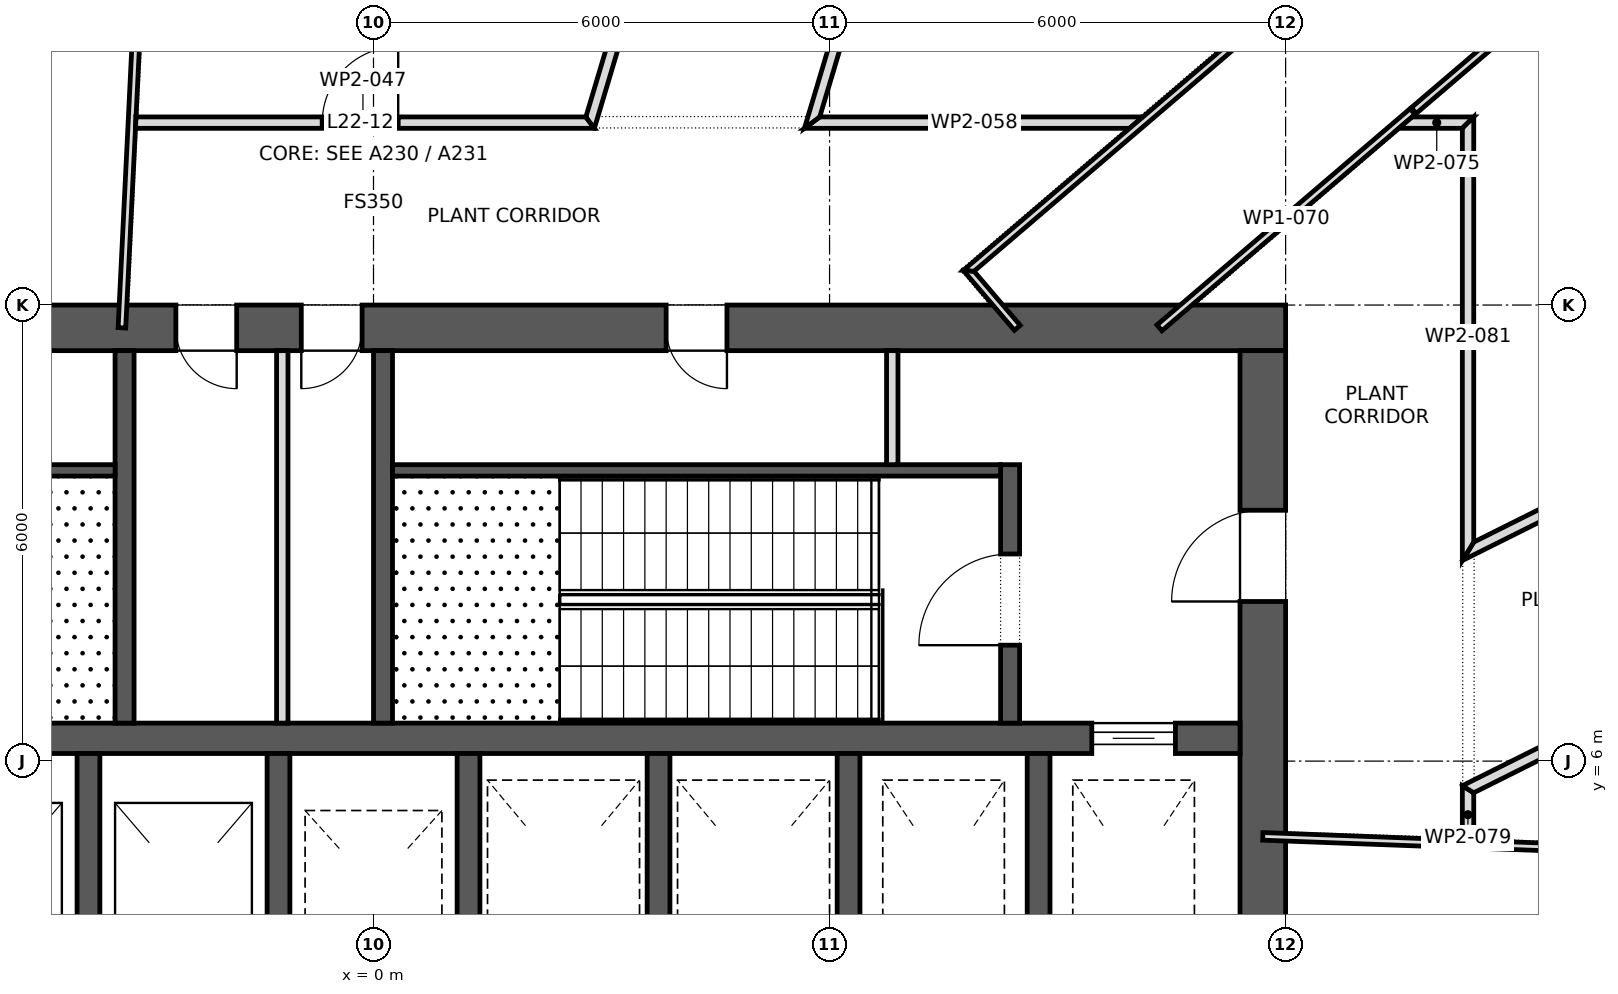
"""IFC4 building model, lengths in metres.
Left out: names, types, materials, properties, quantities, classifications, styles, units other than length and angle.
Written with IfcOpenShell. Run it as: python <this file> out.ifc"""

import sys

from ifc_helpers import new_model, si_unit, direction, frame, frame_2d, origin, place, context, subcontext, project, spatial, polyline, rectangle, outline, extrude, element, fill, save


model = new_model("IFC4")
c1 = context("Model", 3, precision=1e-05, world=origin(), true_north=direction((0.0, 1.0)))
c2 = subcontext(c1, "Body", "Model", "MODEL_VIEW")
j1 = project(units=[si_unit("LENGTHUNIT", "METRE"), si_unit("PLANEANGLEUNIT", "RADIAN")], contexts=[c1])
p1 = place(None, origin())
s1 = spatial("IfcSite", under=j1, at=p1, CompositionType="ELEMENT")
p2 = place(p1, origin())
s2 = spatial("IfcBuilding", under=s1, at=p2, CompositionType="ELEMENT")
p3 = place(p2, frame((0.0, 0.0, 99.1)))
s3 = spatial("IfcBuildingStorey", under=s2, at=p3, CompositionType="ELEMENT", Elevation=99.1)
p4 = place(p3, frame((-12.0, 11.7, 0.0), z_axis=(0.0, 0.0, 1.0), x_axis=(1.0, 0.0, 0.0)))
e1 = element("IfcWall", 1, at=p4, inside=s3, PredefinedType="SHEAR", context=c2, shape_type="SweptSolid", body=[
    extrude(rectangle(XDim=24.0, YDim=0.6, at=frame_2d((12.0, 0.0))), origin(), (0.0, 0.0, 1.0), 5.4),
])
p5 = place(p4, frame((9.4, 0.0, 0.0)))
e2 = element("IfcOpeningElement", 2, at=p5, cuts=e1, PredefinedType="OPENING", context=c2, shape_type="SweptSolid", body=[
    extrude(rectangle(XDim=0.8, YDim=2.1, at=frame_2d((0.4, 1.05))), frame((0.0, 0.312, 0.0), z_axis=(0.0, -1.0, 0.0), x_axis=(1.0, 0.0, 0.0)), (0.0, 0.0, 1.0), 0.624),
])
p6 = place(p4, frame((11.05, 0.0, 0.0)))
e3 = element("IfcOpeningElement", 3, at=p6, cuts=e1, PredefinedType="OPENING", context=c2, shape_type="SweptSolid", body=[
    extrude(rectangle(XDim=0.8, YDim=2.1, at=frame_2d((0.4, 1.05))), frame((0.0, 0.312, 0.0), z_axis=(0.0, -1.0, 0.0), x_axis=(1.0, 0.0, 0.0)), (0.0, 0.0, 1.0), 0.624),
])
p7 = place(p4, frame((4.2, 0.0, 0.0)))
e4 = element("IfcOpeningElement", 4, at=p7, cuts=e1, PredefinedType="OPENING", context=c2, shape_type="SweptSolid", body=[
    extrude(rectangle(XDim=0.8, YDim=2.1, at=frame_2d((0.4, 1.05))), frame((0.0, 0.312, 0.0), z_axis=(0.0, -1.0, 0.0), x_axis=(1.0, 0.0, 0.0)), (0.0, 0.0, 1.0), 0.624),
])
p8 = place(p4, frame((15.85, 0.0, 0.0)))
e5 = element("IfcOpeningElement", 5, at=p8, cuts=e1, PredefinedType="OPENING", context=c2, shape_type="SweptSolid", body=[
    extrude(rectangle(XDim=0.8, YDim=2.1, at=frame_2d((0.4, 1.05))), frame((0.0, 0.312, 0.0), z_axis=(0.0, -1.0, 0.0), x_axis=(1.0, 0.0, 0.0)), (0.0, 0.0, 1.0), 0.624),
])
p9 = place(p3, frame((11.7, -11.4, 0.0), z_axis=(0.0, 0.0, 1.0), x_axis=(0.0, 1.0, 0.0)))
e6 = element("IfcWall", 6, at=p9, inside=s3, PredefinedType="SHEAR", context=c2, shape_type="SweptSolid", body=[
    extrude(rectangle(XDim=22.8, YDim=0.6, at=frame_2d((11.4, 0.0))), origin(), (0.0, 0.0, 1.0), 5.4),
])
p10 = place(p9, frame((10.2, 0.0, 0.0)))
e7 = element("IfcOpeningElement", 7, at=p10, cuts=e6, PredefinedType="OPENING", context=c2, shape_type="SweptSolid", body=[
    extrude(rectangle(XDim=2.4, YDim=2.1, at=frame_2d((1.2, 1.05))), frame((0.0, 0.312, 0.0), z_axis=(0.0, -1.0, 0.0), x_axis=(1.0, 0.0, 0.0)), (0.0, 0.0, 1.0), 0.624),
])
p11 = place(p9, frame((19.5, 0.0, 0.0)))
e8 = element("IfcOpeningElement", 8, at=p11, cuts=e6, PredefinedType="OPENING", context=c2, shape_type="SweptSolid", body=[
    extrude(rectangle(XDim=1.2, YDim=2.1, at=frame_2d((0.6, 1.05))), frame((0.0, 0.312, 0.0), z_axis=(0.0, -1.0, 0.0), x_axis=(1.0, 0.0, 0.0)), (0.0, 0.0, 1.0), 0.624),
])
p12 = place(p9, frame((2.1, 0.0, 0.0)))
e9 = element("IfcOpeningElement", 9, at=p12, cuts=e6, PredefinedType="OPENING", context=c2, shape_type="SweptSolid", body=[
    extrude(rectangle(XDim=1.2, YDim=2.1, at=frame_2d((0.6, 1.05))), frame((0.0, 0.312, 0.0), z_axis=(0.0, -1.0, 0.0), x_axis=(1.0, 0.0, 0.0)), (0.0, 0.0, 1.0), 0.624),
])
p13 = place(p3, frame((-11.4, 6.3, 0.0), z_axis=(0.0, 0.0, 1.0), x_axis=(1.0, 0.0, 0.0)))
e10 = element("IfcWall", 10, at=p13, inside=s3, PredefinedType="SHEAR", context=c2, shape_type="SweptSolid", body=[
    extrude(rectangle(XDim=22.8, YDim=0.4, at=frame_2d((11.4, 0.0))), origin(), (0.0, 0.0, 1.0), 5.4),
])
p14 = place(p13, frame((20.85, 0.0, 0.0)))
e11 = element("IfcOpeningElement", 11, at=p14, cuts=e10, PredefinedType="OPENING", context=c2, shape_type="SweptSolid", body=[
    extrude(rectangle(XDim=1.1, YDim=2.1, at=frame_2d((0.55, 1.05))), frame((0.0, 0.212, 0.0), z_axis=(0.0, -1.0, 0.0), x_axis=(1.0, 0.0, 0.0)), (0.0, 0.0, 1.0), 0.424),
])
for number, where, z_axis, x_axis in (
    (12, (-3.75, 3.2, 0.0), (0.0, 0.0, 1.0), (0.0, 1.0, 0.0)),
    (13, (-1.25, 3.2, 0.0), (0.0, 0.0, 1.0), (0.0, 1.0, 0.0)),
    (14, (1.25, 3.2, 0.0), (0.0, 0.0, 1.0), (0.0, 1.0, 0.0)),
    (15, (3.75, 3.2, 0.0), (0.0, 0.0, 1.0), (0.0, 1.0, 0.0)),
    (16, (6.25, 3.2, 0.0), (0.0, 0.0, 1.0), (0.0, 1.0, 0.0)),
    (17, (8.75, 3.2, 0.0), (0.0, 0.0, 1.0), (0.0, 1.0, 0.0)),
):
    element("IfcWall", number, at=place(p3, frame(where, z_axis=z_axis, x_axis=x_axis)), inside=s3, PredefinedType="SHEAR", context=c2, shape_type="SweptSolid", body=[
        extrude(rectangle(XDim=2.9, YDim=0.3, at=frame_2d((1.45, 0.0))), origin(), (0.0, 0.0, 1.0), 5.4),
    ])
for number, where, z_axis, x_axis in (
    (18, (-3.275, 6.5, 0.0), (0.0, 0.0, 1.0), (0.0, 1.0, 0.0)),
    (19, (0.125, 6.5, 0.0), (0.0, 0.0, 1.0), (0.0, 1.0, 0.0)),
):
    element("IfcWall", number, at=place(p3, frame(where, z_axis=z_axis, x_axis=x_axis)), inside=s3, PredefinedType="SHEAR", context=c2, shape_type="SweptSolid", body=[
        extrude(rectangle(XDim=4.9, YDim=0.25, at=frame_2d((2.45, 0.0))), origin(), (0.0, 0.0, 1.0), 5.1),
    ])
p15 = place(p3, frame((8.375, 6.5, 0.0), z_axis=(0.0, 0.0, 1.0), x_axis=(0.0, 1.0, 0.0)))
e20 = element("IfcWall", 20, at=p15, inside=s3, PredefinedType="SHEAR", context=c2, shape_type="SweptSolid", body=[
    extrude(rectangle(XDim=3.4, YDim=0.25, at=frame_2d((1.7, 0.0))), origin(), (0.0, 0.0, 1.0), 5.1),
])
p16 = place(p15, frame((1.025, 0.0, 0.0)))
e21 = element("IfcOpeningElement", 21, at=p16, cuts=e20, PredefinedType="OPENING", context=c2, shape_type="SweptSolid", body=[
    extrude(rectangle(XDim=1.2, YDim=2.1, at=frame_2d((0.6, 1.05))), frame((0.0, 0.137, 0.0), z_axis=(0.0, -1.0, 0.0), x_axis=(1.0, 0.0, 0.0)), (0.0, 0.0, 1.0), 0.274),
])
for number, where, z_axis, x_axis in (
    (22, (-11.4, 9.825, 0.0), (0.0, 0.0, 1.0), (1.0, 0.0, 0.0)),
    (23, (0.25, 9.825, 0.0), (0.0, 0.0, 1.0), (1.0, 0.0, 0.0)),
):
    element("IfcWall", number, at=place(p3, frame(where, z_axis=z_axis, x_axis=x_axis)), inside=s3, PredefinedType="SHEAR", context=c2, shape_type="SweptSolid", body=[
        extrude(rectangle(XDim=8.0, YDim=0.15, at=frame_2d((4.0, 0.0))), origin(), (0.0, 0.0, 1.0), 5.1),
    ])
p17 = place(p3, frame((-1.2, 6.5, 0.0), z_axis=(0.0, 0.0, 1.0), x_axis=(0.0, 1.0, 0.0)))
e24 = element("IfcWall", 24, at=p17, inside=s3, PredefinedType="PARTITIONING", context=c2, shape_type="SweptSolid", body=[
    extrude(rectangle(XDim=4.9, YDim=0.15, at=frame_2d((2.45, 0.0))), origin(), (0.0, 0.0, 1.0), 5.1),
])
p18 = place(p3, frame((6.825, 9.9, 0.0), z_axis=(0.0, 0.0, 1.0), x_axis=(0.0, 1.0, 0.0)))
e25 = element("IfcWall", 25, at=p18, inside=s3, PredefinedType="PARTITIONING", context=c2, shape_type="SweptSolid", body=[
    extrude(rectangle(XDim=1.5, YDim=0.15, at=frame_2d((0.75, 0.0))), origin(), (0.0, 0.0, 1.0), 5.1),
])
p19 = place(p3, frame((-3.31, 11.7, 0.0), z_axis=(0.0, 0.0, 1.0), x_axis=(0.048854758108, 0.99880589336, 0.0)))
e26 = element("IfcWall", 26, at=p19, inside=s3, PredefinedType="PARTITIONING", context=c2, shape_type="SweptSolid", body=[
    extrude(outline(polyline([(0.0, -0.05), (1.382, -0.05), (2.765, -0.05), (2.781, -0.049), (2.781, -0.05), (4.399, -0.05), (6.018, -0.05), (7.637, -0.05), (9.255, -0.05), (10.874, -0.05), (10.874, 0.05), (9.062, 0.05), (7.249, 0.05), (5.437, 0.05), (3.625, 0.05), (1.812, 0.05), (0.0, 0.05), (0.0, -0.05)])), origin(), (0.0, 0.0, 1.0), 5.1),
])
p20 = place(p3, frame((-3.132, 14.4, 0.0), z_axis=(0.0, 0.0, 1.0), x_axis=(1.0, 0.0, 0.0)))
e27 = element("IfcWall", 27, at=p20, inside=s3, PredefinedType="PARTITIONING", context=c2, shape_type="SweptSolid", body=[
    extrude(outline(polyline([(0.0, -0.075), (1.509, -0.075), (3.019, -0.075), (4.528, -0.075), (6.038, -0.075), (5.982, 0.0), (5.926, 0.075), (3.953, 0.075), (1.98, 0.075), (0.007, 0.075), (0.0, -0.075)])), origin(), (0.0, 0.0, 1.0), 5.1),
])
p21 = place(p20, frame((2.457, 0.0, 0.0)))
e28 = element("IfcOpeningElement", 28, at=p21, cuts=e27, PredefinedType="OPENING", context=c2, shape_type="SweptSolid", body=[
    extrude(rectangle(XDim=1.0, YDim=2.1, at=frame_2d((0.5, 1.05))), frame((0.0, 0.087, 0.0), z_axis=(0.0, -1.0, 0.0), x_axis=(1.0, 0.0, 0.0)), (0.0, 0.0, 1.0), 0.174),
])
p22 = place(p3, frame((2.834, 14.346, 0.0), z_axis=(0.0, 0.0, 1.0), x_axis=(0.286160235994, 0.958181777814, 0.0)))
e29 = element("IfcWall", 29, at=p22, inside=s3, PredefinedType="PARTITIONING", context=c2, shape_type="SweptSolid", body=[
    extrude(outline(polyline([(13.977, -0.075), (13.977, -0.075), (13.809, 0.075), (11.852, 0.075), (9.895, 0.075), (7.938, 0.075), (5.982, 0.075), (4.025, 0.075), (2.068, 0.075), (0.112, 0.075), (0.0, -0.075), (1.997, -0.075), (3.994, -0.075), (5.99, -0.075), (7.987, -0.075), (9.984, -0.075), (11.98, -0.075), (13.977, -0.075)])), origin(), (0.0, 0.0, 1.0), 5.1),
])
p23 = place(p3, frame((5.669, 14.4, 0.0), z_axis=(0.0, 0.0, 1.0), x_axis=(1.0, 0.0, 0.0)))
e30 = element("IfcWall", 30, at=p23, inside=s3, PredefinedType="PARTITIONING", context=c2, shape_type="SweptSolid", body=[
    extrude(outline(polyline([(0.0, -0.075), (1.426, -0.075), (2.852, -0.075), (4.278, -0.075), (4.453, 0.075), (4.453, 0.075), (3.036, 0.075), (1.618, 0.075), (0.201, 0.075), (0.101, 0.0), (0.0, -0.075)])), origin(), (0.0, 0.0, 1.0), 5.1),
])
p24 = place(p3, frame((7.798, 12.488, 0.0), z_axis=(0.0, 0.0, 1.0), x_axis=(0.649042899837, -0.760751808523, 0.0)))
e31 = element("IfcWall", 31, at=p24, inside=s3, PredefinedType="PARTITIONING", context=c2, shape_type="SweptSolid", body=[
    extrude(outline(polyline([(1.036, 0.05), (0.1, 0.05), (0.0, -0.05), (1.036, -0.05), (1.036, 0.05)])), origin(), (0.0, 0.0, 1.0), 5.1),
])
p25 = place(p3, frame((7.792, 12.417, 0.0), z_axis=(0.0, 0.0, 1.0), x_axis=(0.76019424358, 0.649695861175, 0.0)))
e32 = element("IfcWall", 32, at=p25, inside=s3, PredefinedType="PARTITIONING", context=c2, shape_type="SweptSolid", body=[
    extrude(outline(polyline([(15.793, 0.05), (13.819, 0.05), (11.845, 0.05), (9.871, 0.05), (7.897, 0.05), (5.922, 0.05), (3.948, 0.05), (1.974, 0.05), (0.0, 0.05), (0.1, -0.05), (2.062, -0.05), (4.023, -0.05), (5.985, -0.05), (7.947, -0.05), (9.908, -0.05), (11.87, -0.05), (13.832, -0.05), (15.793, -0.05), (15.793, 0.05)])), origin(), (0.0, 0.0, 1.0), 5.1),
])
p26 = place(p3, frame((10.34, 11.7, 0.0), z_axis=(0.0, 0.0, 1.0), x_axis=(0.760272395003, 0.649604406848, 0.0)))
e33 = element("IfcWall", 33, at=p26, inside=s3, PredefinedType="PARTITIONING", context=c2, shape_type="SweptSolid", body=[
    extrude(rectangle(XDim=4.39, YDim=0.1, at=frame_2d((2.195, 0.0))), origin(), (0.0, 0.0, 1.0), 5.1),
])
p27 = place(p3, frame((11.7, 5.01, 0.0), z_axis=(0.0, 0.0, 1.0), x_axis=(0.999299980001, -0.037410559601, 0.0)))
e34 = element("IfcWall", 34, at=p27, inside=s3, PredefinedType="PARTITIONING", context=c2, shape_type="SweptSolid", body=[
    extrude(outline(polyline([(21.346, -0.05), (21.346, -0.049), (21.337, -0.013), (21.312, -0.02), (21.294, 0.05), (19.358, 0.05), (17.422, 0.05), (15.486, 0.05), (13.551, 0.05), (11.615, 0.05), (9.679, 0.05), (7.743, 0.05), (5.807, 0.05), (3.872, 0.05), (1.936, 0.05), (0.0, 0.05), (0.0, -0.05), (1.941, -0.05), (3.881, -0.05), (5.822, -0.05), (7.762, -0.05), (9.703, -0.05), (11.644, -0.05), (13.584, -0.05), (15.525, -0.05), (17.465, -0.05), (19.406, -0.05), (21.346, -0.05)])), origin(), (0.0, 0.0, 1.0), 5.1),
])
p28 = place(p3, frame((13.488, 14.4, 0.0), z_axis=(0.0, 0.0, 1.0), x_axis=(1.0, 0.0, 0.0)))
e35 = element("IfcWall", 35, at=p28, inside=s3, PredefinedType="PARTITIONING", context=c2, shape_type="SweptSolid", body=[
    extrude(outline(polyline([(0.001, -0.075), (0.837, -0.075), (0.837, -0.075), (0.987, 0.075), (0.177, 0.075), (0.001, -0.075)])), origin(), (0.0, 0.0, 1.0), 5.1),
])
p29 = place(p3, frame((14.4, 5.677, 0.0), z_axis=(0.0, 0.0, 1.0), x_axis=(0.0, -1.0, 0.0)))
e36 = element("IfcWall", 36, at=p29, inside=s3, PredefinedType="PARTITIONING", context=c2, shape_type="SweptSolid", body=[
    extrude(outline(polyline([(0.0, -0.075), (0.715, -0.075), (0.72, 0.065), (0.72, 0.075), (0.093, 0.075), (0.047, 0.0), (0.0, -0.075)])), origin(), (0.0, 0.0, 1.0), 5.1),
])
p30 = place(p3, frame((14.292, 8.706, 0.0), z_axis=(0.0, 0.0, 1.0), x_axis=(0.894694684053, 0.446678208925, 0.0)))
e37 = element("IfcWall", 37, at=p30, inside=s3, PredefinedType="PARTITIONING", context=c2, shape_type="SweptSolid", body=[
    extrude(outline(polyline([(15.324, -0.075), (15.324, -0.075), (15.141, 0.075), (13.279, 0.075), (11.417, 0.075), (9.554, 0.075), (7.692, 0.075), (5.83, 0.075), (3.967, 0.075), (2.105, 0.075), (0.242, 0.075), (0.0, -0.075), (1.916, -0.075), (3.831, -0.075), (5.747, -0.075), (7.662, -0.075), (9.578, -0.075), (11.493, -0.075), (13.409, -0.075), (15.324, -0.075)])), origin(), (0.0, 0.0, 1.0), 5.1),
])
p31 = place(p30, frame((7.177, 0.0, 0.0)))
e38 = element("IfcOpeningElement", 38, at=p31, cuts=e37, PredefinedType="OPENING", context=c2, shape_type="SweptSolid", body=[
    extrude(rectangle(XDim=1.0, YDim=2.1, at=frame_2d((0.5, 1.05))), frame((0.0, 0.087, 0.0), z_axis=(0.0, -1.0, 0.0), x_axis=(1.0, 0.0, 0.0)), (0.0, 0.0, 1.0), 0.174),
])
p32 = place(p3, frame((14.4, 14.475, 0.0), z_axis=(0.0, 0.0, 1.0), x_axis=(0.0, -1.0, 0.0)))
e39 = element("IfcWall", 39, at=p32, inside=s3, PredefinedType="PARTITIONING", context=c2, shape_type="SweptSolid", body=[
    extrude(outline(polyline([(5.836, -0.075), (5.836, -0.075), (5.594, 0.075), (3.729, 0.075), (1.865, 0.075), (0.0, 0.075), (0.15, -0.075), (2.046, -0.075), (3.941, -0.075), (5.836, -0.075)])), origin(), (0.0, 0.0, 1.0), 5.1),
])
p33 = place(p3, frame((29.752, 13.296, 0.0), z_axis=(0.0, 0.0, 1.0), x_axis=(-0.894665437073, -0.446736785711, 0.0)))
e40 = element("IfcWall", 40, at=p33, inside=s3, PredefinedType="PARTITIONING", context=c2, shape_type="SweptSolid", body=[
    extrude(outline(polyline([(0.0, -0.075), (1.912, -0.075), (3.824, -0.075), (5.736, -0.075), (7.647, -0.075), (9.559, -0.075), (11.471, -0.075), (13.383, -0.075), (15.295, -0.075), (17.207, -0.075), (17.114, 0.075), (15.229, 0.075), (13.344, 0.075), (11.46, 0.075), (9.575, 0.075), (7.691, 0.075), (5.806, 0.075), (3.921, 0.075), (2.037, 0.075), (0.152, 0.075), (0.0, -0.075)])), origin(), (0.0, 0.0, 1.0), 5.1),
])
p34 = place(p33, frame((8.121, 0.0, 0.0)))
e41 = element("IfcOpeningElement", 41, at=p34, cuts=e40, PredefinedType="OPENING", context=c2, shape_type="SweptSolid", body=[
    extrude(rectangle(XDim=1.0, YDim=2.1, at=frame_2d((0.5, 1.05))), frame((0.0, 0.087, 0.0), z_axis=(0.0, -1.0, 0.0), x_axis=(1.0, 0.0, 0.0)), (0.0, 0.0, 1.0), 0.174),
])
p35 = place(p3, frame((8.23, 22.631, 0.0), z_axis=(0.0, 0.0, 1.0), x_axis=(-0.286358109642, -0.95812266075, 0.0)))
e42 = element("IfcWall", 42, at=p35, inside=s3, PredefinedType="PARTITIONING", context=c2, shape_type="SweptSolid", body=[
    extrude(outline(polyline([(0.0, -0.075), (1.738, -0.075), (3.476, -0.075), (5.215, -0.075), (6.953, -0.075), (8.691, -0.075), (8.49, 0.075), (6.792, 0.075), (5.094, 0.075), (3.396, 0.075), (1.698, 0.075), (0.0, 0.075), (0.0, -0.075)])), origin(), (0.0, 0.0, 1.0), 5.1),
])
p36 = place(p35, frame((1.421, 0.0, 0.0)))
e43 = element("IfcOpeningElement", 43, at=p36, cuts=e42, PredefinedType="OPENING", context=c2, shape_type="SweptSolid", body=[
    extrude(rectangle(XDim=1.0, YDim=2.1, at=frame_2d((0.5, 1.05))), frame((0.0, 0.087, 0.0), z_axis=(0.0, -1.0, 0.0), x_axis=(1.0, 0.0, 0.0)), (0.0, 0.0, 1.0), 0.174),
])
p37 = place(p3, frame((13.678, 14.552, 0.0), z_axis=(0.0, 0.0, 1.0), x_axis=(0.760241551137, 0.649640503605, 0.0)))
e44 = element("IfcWall", 44, at=p37, inside=s3, PredefinedType="PARTITIONING", context=c2, shape_type="SweptSolid", body=[
    extrude(rectangle(XDim=3.688, YDim=0.1, at=frame_2d((1.844, 0.0))), origin(), (0.0, 0.0, 1.0), 4.347),
])
p38 = place(p14, origin())
e45 = element("IfcDoor", 45, at=p38, inside=s3, OperationType="SLIDING_TO_LEFT", PredefinedType="DOOR", context=c2, shape_type="SweptSolid", body=[
    extrude(rectangle(XDim=1.1, YDim=2.1, at=frame_2d((0.55, 1.05))), frame((0.0, 0.025, 0.0), z_axis=(0.0, -1.0, 0.0), x_axis=(1.0, 0.0, 0.0)), (0.0, 0.0, 1.0), 0.05),
])
fill(e11, e45)
p39 = place(p16, origin())
e46 = element("IfcDoor", 46, at=p39, inside=s3, OperationType="SINGLE_SWING_RIGHT", PredefinedType="DOOR", context=c2, shape_type="SweptSolid", body=[
    extrude(rectangle(XDim=1.2, YDim=2.1, at=frame_2d((0.6, 1.05))), frame((0.0, 0.025, 0.0), z_axis=(0.0, -1.0, 0.0), x_axis=(1.0, 0.0, 0.0)), (0.0, 0.0, 1.0), 0.05),
])
fill(e21, e46)
p40 = place(p11, origin())
e47 = element("IfcDoor", 47, at=p40, inside=s3, OperationType="SINGLE_SWING_RIGHT", PredefinedType="DOOR", context=c2, shape_type="SweptSolid", body=[
    extrude(rectangle(XDim=1.2, YDim=2.1, at=frame_2d((0.6, 1.05))), frame((0.0, 0.025, 0.0), z_axis=(0.0, -1.0, 0.0), x_axis=(1.0, 0.0, 0.0)), (0.0, 0.0, 1.0), 0.05),
])
fill(e8, e47)
p41 = place(p5, frame((0.8, 0.0, 0.0), z_axis=(0.0, 0.0, 1.0), x_axis=(-1.0, 0.0, 0.0)))
e48 = element("IfcDoor", 48, at=p41, inside=s3, OperationType="SINGLE_SWING_RIGHT", PredefinedType="DOOR", context=c2, shape_type="SweptSolid", body=[
    extrude(rectangle(XDim=0.8, YDim=2.1, at=frame_2d((0.4, 1.05))), frame((0.0, 0.025, 0.0), z_axis=(0.0, -1.0, 0.0), x_axis=(1.0, 0.0, 0.0)), (0.0, 0.0, 1.0), 0.05),
])
fill(e2, e48)
p42 = place(p6, frame((0.8, 0.0, 0.0), z_axis=(0.0, 0.0, 1.0), x_axis=(-1.0, 0.0, 0.0)))
e49 = element("IfcDoor", 49, at=p42, inside=s3, OperationType="SINGLE_SWING_LEFT", PredefinedType="DOOR", context=c2, shape_type="SweptSolid", body=[
    extrude(rectangle(XDim=0.8, YDim=2.1, at=frame_2d((0.4, 1.05))), frame((0.0, 0.025, 0.0), z_axis=(0.0, -1.0, 0.0), x_axis=(1.0, 0.0, 0.0)), (0.0, 0.0, 1.0), 0.05),
])
fill(e3, e49)
p43 = place(p8, frame((0.8, 0.0, 0.0), z_axis=(0.0, 0.0, 1.0), x_axis=(-1.0, 0.0, 0.0)))
e50 = element("IfcDoor", 50, at=p43, inside=s3, OperationType="SINGLE_SWING_RIGHT", PredefinedType="DOOR", context=c2, shape_type="SweptSolid", body=[
    extrude(rectangle(XDim=0.8, YDim=2.1, at=frame_2d((0.4, 1.05))), frame((0.0, 0.025, 0.0), z_axis=(0.0, -1.0, 0.0), x_axis=(1.0, 0.0, 0.0)), (0.0, 0.0, 1.0), 0.05),
])
fill(e5, e50)
p44 = place(p21, origin())
e51 = element("IfcDoor", 51, at=p44, inside=s3, OperationType="SINGLE_SWING_LEFT", PredefinedType="DOOR", context=c2, shape_type="SweptSolid", body=[
    extrude(rectangle(XDim=1.0, YDim=2.1, at=frame_2d((0.5, 1.05))), frame((0.0, 0.025, 0.0), z_axis=(0.0, -1.0, 0.0), x_axis=(1.0, 0.0, 0.0)), (0.0, 0.0, 1.0), 0.05),
])
fill(e28, e51)
save(model, sys.argv[1])
